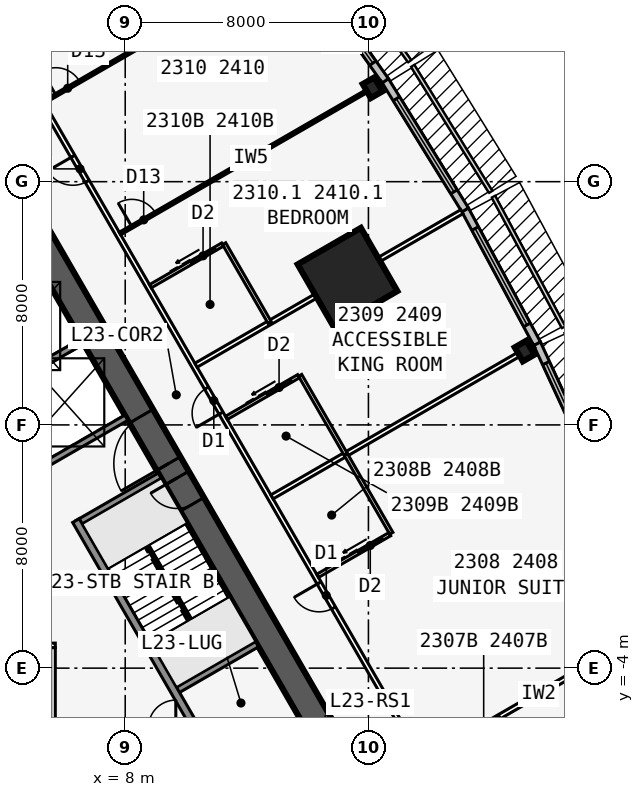
"""IFC4 building model, lengths in metres.
Left out: names, types, materials, properties, quantities, classifications, styles, units other than length and angle.
Written with IfcOpenShell. Run it as: python <this file> out.ifc"""

import sys

from ifc_helpers import new_model, si_unit, direction, frame, frame_2d, origin, origin_2d, place, context, subcontext, project, spatial, rectangle, i_section, extrude, element, fill, save


model = new_model("IFC4")
c1 = context("Model", 3, precision=1e-05, world=origin(), true_north=direction((0.0, 1.0)))
c2 = subcontext(c1, "Body", "Model", "MODEL_VIEW")
j1 = project(units=[si_unit("LENGTHUNIT", "METRE"), si_unit("PLANEANGLEUNIT", "RADIAN")], contexts=[c1])
p1 = place(None, origin())
s1 = spatial("IfcSite", under=j1, at=p1, CompositionType="ELEMENT")
p2 = place(p1, origin())
s2 = spatial("IfcBuilding", under=s1, at=p2, CompositionType="ELEMENT")
p3 = place(p2, frame((0.0, 0.0, 89.7)))
s3 = spatial("IfcBuildingStorey", under=s2, at=p3, CompositionType="ELEMENT", Elevation=89.7)
p4 = place(p3, frame((16.5, -9.526, 0.0), z_axis=(0.0, 0.0, 1.0), x_axis=(-0.499999749417, 0.866025548458, 0.0)))
e1 = element("IfcWall", 1, at=p4, inside=s3, PredefinedType="SHEAR", context=c2, shape_type="SweptSolid", body=[
    extrude(rectangle(XDim=33.0, YDim=0.9, at=frame_2d((16.5, 0.0))), origin(), (0.0, 0.0, 1.0), 3.4),
])
p5 = place(p4, frame((14.15, 0.0, 0.0)))
e2 = element("IfcOpeningElement", 2, at=p5, cuts=e1, PredefinedType="OPENING", context=c2, shape_type="SweptSolid", body=[
    extrude(rectangle(XDim=1.8, YDim=2.13, at=frame_2d((0.9, 1.065))), frame((0.0, 0.46, 0.0), z_axis=(0.0, -1.0, 0.0), x_axis=(1.0, 0.0, 0.0)), (0.0, 0.0, 1.0), 0.92),
])
p6 = place(p4, frame((12.6, 0.0, 0.0)))
e3 = element("IfcOpeningElement", 3, at=p6, cuts=e1, PredefinedType="OPENING", context=c2, shape_type="SweptSolid", body=[
    extrude(rectangle(XDim=1.0, YDim=2.13, at=frame_2d((0.5, 1.065))), frame((0.0, 0.46, 0.0), z_axis=(0.0, -1.0, 0.0), x_axis=(1.0, 0.0, 0.0)), (0.0, 0.0, 1.0), 0.92),
])
p7 = place(p3, frame((10.245, -5.843, 0.0), z_axis=(0.0, 0.0, 1.0), x_axis=(-0.499993009313, 0.866029439822, 0.0)))
e4 = element("IfcWall", 4, at=p7, inside=s3, PredefinedType="SOLIDWALL", context=c2, shape_type="SweptSolid", body=[
    extrude(rectangle(XDim=7.733, YDim=0.25, at=frame_2d((3.866, 0.0))), origin(), (0.0, 0.0, 1.0), 3.235),
])
for number, where, z_axis, x_axis in (
    (5, (9.629, -4.775, 0.0), (0.0, 0.0, 1.0), (0.866, 0.5, 0.0)),
    (6, (6.429, 0.767, 0.0), (0.0, 0.0, 1.0), (0.866, 0.5, 0.0)),
    (7, (5.329, 2.673, 0.0), (0.0, 0.0, 1.0), (0.866, 0.5, 0.0)),
    (8, (3.879, 5.184, 0.0), (0.0, 0.0, 1.0), (0.866, 0.5, 0.0)),
):
    element("IfcWall", number, at=place(p3, frame(where, z_axis=z_axis, x_axis=x_axis)), inside=s3, PredefinedType="SOLIDWALL", context=c2, shape_type="SweptSolid", body=[
        extrude(rectangle(XDim=3.125, YDim=0.2, at=frame_2d((1.562, 0.0))), origin(), (0.0, 0.0, 1.0), 3.235),
    ])
for number, where, z_axis, x_axis in (
    (9, (21.137, 6.43, 0.0), (0.0, 0.0, 1.0), (0.866, 0.5, 0.0)),
    (10, (16.137, 15.09, 0.0), (0.0, 0.0, 1.0), (0.866, 0.5, 0.0)),
):
    element("IfcColumn", number, at=place(p3, frame(where, z_axis=z_axis, x_axis=x_axis)), inside=s3, PredefinedType="COLUMN", context=c2, shape_type="SweptSolid", body=[
        extrude(i_section(OverallWidth=0.442, OverallDepth=0.531, WebThickness=0.066, FlangeThickness=0.106, at=origin_2d()), origin(), (0.0, 0.0, 1.0), 3.4),
    ])
p8 = place(p3, frame((15.312, 8.84, 0.0), z_axis=(0.0, 0.0, 1.0), x_axis=(0.866025403784, 0.5, 0.0)))
e11 = element("IfcColumn", 11, at=p8, inside=s3, PredefinedType="COLUMN", context=c2, shape_type="SweptSolid", body=[
    extrude(rectangle(XDim=2.4, YDim=2.4, at=origin_2d()), origin(), (0.0, 0.0, 1.0), 3.4),
])
p9 = place(p3, frame((23.648, 2.119, 0.0), z_axis=(0.0, 0.0, 1.0), x_axis=(-0.419203100754, 0.907892482796, 0.0)))
e12 = element("IfcWall", 12, at=p9, inside=s3, PredefinedType="STANDARD", context=c2, shape_type="SweptSolid", body=[
    extrude(rectangle(XDim=5.021, YDim=0.25, at=frame_2d((2.51, 0.0))), origin(), (0.0, 0.0, 1.0), 3.235),
])
p10 = place(p9, frame((0.71, 0.0, 0.45)))
e13 = element("IfcOpeningElement", 13, at=p10, cuts=e12, PredefinedType="OPENING", context=c2, shape_type="SweptSolid", body=[
    extrude(rectangle(XDim=3.6, YDim=2.4, at=frame_2d((1.8, 1.2))), frame((0.0, 0.135, 0.0), z_axis=(0.0, -1.0, 0.0), x_axis=(1.0, 0.0, 0.0)), (0.0, 0.0, 1.0), 0.27),
])
p11 = place(p3, frame((21.547, 6.671, 0.0), z_axis=(0.0, 0.0, 1.0), x_axis=(-0.473412820489, 0.880840678782, 0.0)))
e14 = element("IfcWall", 14, at=p11, inside=s3, PredefinedType="STANDARD", context=c2, shape_type="SweptSolid", body=[
    extrude(rectangle(XDim=5.002, YDim=0.25, at=frame_2d((2.501, 0.0))), origin(), (0.0, 0.0, 1.0), 3.235),
])
p12 = place(p11, frame((0.701, 0.0, 0.45)))
e15 = element("IfcOpeningElement", 15, at=p12, cuts=e14, PredefinedType="OPENING", context=c2, shape_type="SweptSolid", body=[
    extrude(rectangle(XDim=3.6, YDim=2.4, at=frame_2d((1.8, 1.2))), frame((0.0, 0.135, 0.0), z_axis=(0.0, -1.0, 0.0), x_axis=(1.0, 0.0, 0.0)), (0.0, 0.0, 1.0), 0.27),
])
p13 = place(p3, frame((19.182, 11.071, 0.0), z_axis=(0.0, 0.0, 1.0), x_axis=(-0.526132807704, 0.850402415717, 0.0)))
e16 = element("IfcWall", 16, at=p13, inside=s3, PredefinedType="STANDARD", context=c2, shape_type="SweptSolid", body=[
    extrude(rectangle(XDim=5.002, YDim=0.25, at=frame_2d((2.501, 0.0))), origin(), (0.0, 0.0, 1.0), 3.235),
])
p14 = place(p13, frame((0.701, 0.0, 0.45)))
e17 = element("IfcOpeningElement", 17, at=p14, cuts=e16, PredefinedType="OPENING", context=c2, shape_type="SweptSolid", body=[
    extrude(rectangle(XDim=3.6, YDim=2.4, at=frame_2d((1.8, 1.2))), frame((0.0, 0.135, 0.0), z_axis=(0.0, -1.0, 0.0), x_axis=(1.0, 0.0, 0.0)), (0.0, 0.0, 1.0), 0.27),
])
p15 = place(p3, frame((16.555, 15.318, 0.0), z_axis=(0.0, 0.0, 1.0), x_axis=(-0.5766431066, 0.81699616132, 0.0)))
e18 = element("IfcWall", 18, at=p15, inside=s3, PredefinedType="STANDARD", context=c2, shape_type="SweptSolid", body=[
    extrude(rectangle(XDim=5.021, YDim=0.25, at=frame_2d((2.51, 0.0))), origin(), (0.0, 0.0, 1.0), 3.235),
])
p16 = place(p15, frame((0.71, 0.0, 0.45)))
e19 = element("IfcOpeningElement", 19, at=p16, cuts=e18, PredefinedType="OPENING", context=c2, shape_type="SweptSolid", body=[
    extrude(rectangle(XDim=3.6, YDim=2.4, at=frame_2d((1.8, 1.2))), frame((0.0, 0.135, 0.0), z_axis=(0.0, -1.0, 0.0), x_axis=(1.0, 0.0, 0.0)), (0.0, 0.0, 1.0), 0.27),
])
p17 = place(p3, frame((20.027, -10.985, 0.0), z_axis=(0.0, 0.0, 1.0), x_axis=(-0.500001677587, 0.866024435227, 0.0)))
e20 = element("IfcWall", 20, at=p17, inside=s3, PredefinedType="PARTITIONING", context=c2, shape_type="SweptSolid", body=[
    extrude(rectangle(XDim=39.054, YDim=0.15, at=frame_2d((19.527, 0.0))), origin(), (0.0, 0.0, 1.0), 3.235),
])
p18 = place(p17, frame((0.352, 0.0, 0.0)))
e21 = element("IfcOpeningElement", 21, at=p18, cuts=e20, PredefinedType="OPENING", context=c2, shape_type="SweptSolid", body=[
    extrude(rectangle(XDim=0.95, YDim=2.13, at=frame_2d((0.475, 1.065))), frame((0.0, 0.085, 0.0), z_axis=(0.0, -1.0, 0.0), x_axis=(1.0, 0.0, 0.0)), (0.0, 0.0, 1.0), 0.17),
])
p19 = place(p17, frame((10.352, 0.0, 0.0)))
e22 = element("IfcOpeningElement", 22, at=p19, cuts=e20, PredefinedType="OPENING", context=c2, shape_type="SweptSolid", body=[
    extrude(rectangle(XDim=0.95, YDim=2.13, at=frame_2d((0.475, 1.065))), frame((0.0, 0.085, 0.0), z_axis=(0.0, -1.0, 0.0), x_axis=(1.0, 0.0, 0.0)), (0.0, 0.0, 1.0), 0.17),
])
p20 = place(p17, frame((17.752, 0.0, 0.0)))
e23 = element("IfcOpeningElement", 23, at=p20, cuts=e20, PredefinedType="OPENING", context=c2, shape_type="SweptSolid", body=[
    extrude(rectangle(XDim=0.95, YDim=2.13, at=frame_2d((0.475, 1.065))), frame((0.0, 0.085, 0.0), z_axis=(0.0, -1.0, 0.0), x_axis=(1.0, 0.0, 0.0)), (0.0, 0.0, 1.0), 0.17),
])
p21 = place(p17, frame((26.552, 0.0, 0.0)))
e24 = element("IfcOpeningElement", 24, at=p21, cuts=e20, PredefinedType="OPENING", context=c2, shape_type="SweptSolid", body=[
    extrude(rectangle(XDim=0.95, YDim=2.13, at=frame_2d((0.475, 1.065))), frame((0.0, 0.085, 0.0), z_axis=(0.0, -1.0, 0.0), x_axis=(1.0, 0.0, 0.0)), (0.0, 0.0, 1.0), 0.17),
])
p22 = place(p17, frame((37.752, 0.0, 0.0)))
e25 = element("IfcOpeningElement", 25, at=p22, cuts=e20, PredefinedType="OPENING", context=c2, shape_type="SweptSolid", body=[
    extrude(rectangle(XDim=0.95, YDim=2.13, at=frame_2d((0.475, 1.065))), frame((0.0, 0.085, 0.0), z_axis=(0.0, -1.0, 0.0), x_axis=(1.0, 0.0, 0.0)), (0.0, 0.0, 1.0), 0.17),
])
p23 = place(p3, frame((17.829, -7.027, 0.0), z_axis=(0.0, 0.0, 1.0), x_axis=(0.866032659912, 0.499987431809, 0.0)))
e26 = element("IfcWall", 26, at=p23, inside=s3, PredefinedType="PARTITIONING", context=c2, shape_type="SweptSolid", body=[
    extrude(rectangle(XDim=8.72, YDim=0.15, at=frame_2d((4.36, 0.0))), origin(), (0.0, 0.0, 1.0), 2.389),
])
p24 = place(p3, frame((12.829, 1.633, 0.0), z_axis=(0.0, 0.0, 1.0), x_axis=(0.866026934769, 0.499997348248, 0.0)))
e27 = element("IfcWall", 27, at=p24, inside=s3, PredefinedType="PARTITIONING", context=c2, shape_type="SweptSolid", body=[
    extrude(rectangle(XDim=9.943, YDim=0.15, at=frame_2d((4.971, 0.0))), origin(), (0.0, 0.0, 1.0), 2.389),
])
p25 = place(p3, frame((10.329, 5.963, 0.0), z_axis=(0.0, 0.0, 1.0), x_axis=(0.866021688545, 0.500006434927, 0.0)))
e28 = element("IfcWall", 28, at=p25, inside=s3, PredefinedType="PARTITIONING", context=c2, shape_type="SweptSolid", body=[
    extrude(rectangle(XDim=10.096, YDim=0.15, at=frame_2d((5.048, 0.0))), origin(), (0.0, 0.0, 1.0), 2.389),
])
p26 = place(p3, frame((7.829, 10.293, 0.0), z_axis=(0.0, 0.0, 1.0), x_axis=(0.866016302457, 0.50001576363, 0.0)))
e29 = element("IfcWall", 29, at=p26, inside=s3, PredefinedType="PARTITIONING", context=c2, shape_type="SweptSolid", body=[
    extrude(rectangle(XDim=9.943, YDim=0.1, at=frame_2d((4.972, 0.0))), origin(), (0.0, 0.0, 1.0), 2.389),
])
p27 = place(p26, frame((0.45, 0.0, 0.0)))
e30 = element("IfcOpeningElement", 30, at=p27, cuts=e29, PredefinedType="OPENING", context=c2, shape_type="SweptSolid", body=[
    extrude(rectangle(XDim=0.9, YDim=2.13, at=frame_2d((0.45, 1.065))), frame((0.0, 0.06, 0.0), z_axis=(0.0, -1.0, 0.0), x_axis=(1.0, 0.0, 0.0)), (0.0, 0.0, 1.0), 0.12),
])
p28 = place(p3, frame((5.329, 14.623, 0.0), z_axis=(0.0, 0.0, 1.0), x_axis=(0.866018409083, 0.500012114982, 0.0)))
e31 = element("IfcWall", 31, at=p28, inside=s3, PredefinedType="PARTITIONING", context=c2, shape_type="SweptSolid", body=[
    extrude(rectangle(XDim=9.485, YDim=0.1, at=frame_2d((4.742, 0.0))), origin(), (0.0, 0.0, 1.0), 2.389),
])
p29 = place(p28, frame((0.45, 0.0, 0.0)))
e32 = element("IfcOpeningElement", 32, at=p29, cuts=e31, PredefinedType="OPENING", context=c2, shape_type="SweptSolid", body=[
    extrude(rectangle(XDim=0.9, YDim=2.13, at=frame_2d((0.45, 1.065))), frame((0.0, 0.06, 0.0), z_axis=(0.0, -1.0, 0.0), x_axis=(1.0, 0.0, 0.0)), (0.0, 0.0, 1.0), 0.12),
])
for number, where, z_axis, x_axis in (
    (33, (21.753, -8.225, 0.0), (0.0, 0.0, 1.0), (-0.5, 0.866, 0.0)),
    (34, (16.753, 0.435, 0.0), (0.0, 0.0, 1.0), (-0.5, 0.866, 0.0)),
):
    element("IfcWall", number, at=place(p3, frame(where, z_axis=z_axis, x_axis=x_axis)), inside=s3, PredefinedType="PLUMBINGWALL", context=c2, shape_type="SweptSolid", body=[
        extrude(rectangle(XDim=3.0, YDim=0.12, at=frame_2d((1.5, 0.0))), origin(), (0.0, 0.0, 1.0), 3.235),
    ])
p30 = place(p3, frame((14.329, -0.965, 0.0), z_axis=(0.0, 0.0, 1.0), x_axis=(0.866035715982, 0.499982138324, 0.0)))
e35 = element("IfcWall", 35, at=p30, inside=s3, PredefinedType="PLUMBINGWALL", context=c2, shape_type="SweptSolid", body=[
    extrude(rectangle(XDim=2.74, YDim=0.12, at=frame_2d((1.37, 0.0))), origin(), (0.0, 0.0, 1.0), 3.235),
])
p31 = place(p30, frame((1.55, 0.0, 0.0)))
e36 = element("IfcOpeningElement", 36, at=p31, cuts=e35, PredefinedType="OPENING", context=c2, shape_type="SweptSolid", body=[
    extrude(rectangle(XDim=0.9, YDim=2.13, at=frame_2d((0.45, 1.065))), frame((0.0, 0.07, 0.0), z_axis=(0.0, -1.0, 0.0), x_axis=(1.0, 0.0, 0.0)), (0.0, 0.0, 1.0), 0.14),
])
p32 = place(p3, frame((15.253, 3.033, 0.0), z_axis=(0.0, 0.0, 1.0), x_axis=(-0.499990139034, 0.866031096941, 0.0)))
e37 = element("IfcWall", 37, at=p32, inside=s3, PredefinedType="PLUMBINGWALL", context=c2, shape_type="SweptSolid", body=[
    extrude(rectangle(XDim=3.0, YDim=0.12, at=frame_2d((1.5, 0.0))), origin(), (0.0, 0.0, 1.0), 3.235),
])
p33 = place(p3, frame((11.329, 4.231, 0.0), z_axis=(0.0, 0.0, 1.0), x_axis=(0.866035715982, 0.499982138324, 0.0)))
e38 = element("IfcWall", 38, at=p33, inside=s3, PredefinedType="PLUMBINGWALL", context=c2, shape_type="SweptSolid", body=[
    extrude(rectangle(XDim=2.74, YDim=0.12, at=frame_2d((1.37, 0.0))), origin(), (0.0, 0.0, 1.0), 3.235),
])
p34 = place(p33, frame((1.55, 0.0, 0.0)))
e39 = element("IfcOpeningElement", 39, at=p34, cuts=e38, PredefinedType="OPENING", context=c2, shape_type="SweptSolid", body=[
    extrude(rectangle(XDim=0.9, YDim=2.13, at=frame_2d((0.45, 1.065))), frame((0.0, 0.07, 0.0), z_axis=(0.0, -1.0, 0.0), x_axis=(1.0, 0.0, 0.0)), (0.0, 0.0, 1.0), 0.14),
])
p35 = place(p3, frame((12.753, 7.363, 0.0), z_axis=(0.0, 0.0, 1.0), x_axis=(-0.499990139034, 0.866031096941, 0.0)))
e40 = element("IfcWall", 40, at=p35, inside=s3, PredefinedType="PLUMBINGWALL", context=c2, shape_type="SweptSolid", body=[
    extrude(rectangle(XDim=3.0, YDim=0.12, at=frame_2d((1.5, 0.0))), origin(), (0.0, 0.0, 1.0), 3.235),
])
p36 = place(p3, frame((8.829, 8.561, 0.0), z_axis=(0.0, 0.0, 1.0), x_axis=(0.866035715982, 0.499982138324, 0.0)))
e41 = element("IfcWall", 41, at=p36, inside=s3, PredefinedType="PLUMBINGWALL", context=c2, shape_type="SweptSolid", body=[
    extrude(rectangle(XDim=2.74, YDim=0.12, at=frame_2d((1.37, 0.0))), origin(), (0.0, 0.0, 1.0), 3.235),
])
p37 = place(p36, frame((1.55, 0.0, 0.0)))
e42 = element("IfcOpeningElement", 42, at=p37, cuts=e41, PredefinedType="OPENING", context=c2, shape_type="SweptSolid", body=[
    extrude(rectangle(XDim=0.9, YDim=2.13, at=frame_2d((0.45, 1.065))), frame((0.0, 0.07, 0.0), z_axis=(0.0, -1.0, 0.0), x_axis=(1.0, 0.0, 0.0)), (0.0, 0.0, 1.0), 0.14),
])
p38 = place(p3, frame((-2.65, -3.251, 0.0), z_axis=(0.0, 0.0, 1.0), x_axis=(1.0, 0.0, 0.0)))
e43 = element("IfcWall", 43, at=p38, inside=s3, PredefinedType="PARTITIONING", context=c2, shape_type="SweptSolid", body=[
    extrude(rectangle(XDim=8.35, YDim=0.15, at=frame_2d((4.175, 0.0))), origin(), (0.0, 0.0, 1.0), 3.235),
])
p39 = place(p3, frame((5.625, -5.826, 0.0), z_axis=(0.0, 0.0, 1.0), x_axis=(0.0, 1.0, 0.0)))
e44 = element("IfcWall", 44, at=p39, inside=s3, PredefinedType="PARTITIONING", context=c2, shape_type="SweptSolid", body=[
    extrude(rectangle(XDim=2.5, YDim=0.15, at=frame_2d((1.25, 0.0))), origin(), (0.0, 0.0, 1.0), 3.235),
])
p40 = place(p3, frame((10.135, -2.401, 0.0), z_axis=(0.0, 0.0, 1.0), x_axis=(-0.499992232847, 0.866029888106, 0.0)))
e45 = element("IfcWall", 45, at=p40, inside=s3, PredefinedType="SOLIDWALL", context=c2, shape_type="SweptSolid", body=[
    extrude(rectangle(XDim=2.794, YDim=0.1, at=frame_2d((1.397, 0.0))), origin(), (0.0, 0.0, 1.0), 3.4),
])
p41 = place(p10, origin())
e46 = element("IfcWindow", 46, at=p41, inside=s3, PartitioningType="SINGLE_PANEL", PredefinedType="WINDOW", context=c2, shape_type="SweptSolid", body=[
    extrude(rectangle(XDim=3.6, YDim=2.4, at=frame_2d((1.8, 1.2))), frame((0.0, 0.03, 0.0), z_axis=(0.0, -1.0, 0.0), x_axis=(1.0, 0.0, 0.0)), (0.0, 0.0, 1.0), 0.06),
])
fill(e13, e46)
p42 = place(p12, origin())
e47 = element("IfcWindow", 47, at=p42, inside=s3, PartitioningType="SINGLE_PANEL", PredefinedType="WINDOW", context=c2, shape_type="SweptSolid", body=[
    extrude(rectangle(XDim=3.6, YDim=2.4, at=frame_2d((1.8, 1.2))), frame((0.0, 0.03, 0.0), z_axis=(0.0, -1.0, 0.0), x_axis=(1.0, 0.0, 0.0)), (0.0, 0.0, 1.0), 0.06),
])
fill(e15, e47)
p43 = place(p14, origin())
e48 = element("IfcWindow", 48, at=p43, inside=s3, PartitioningType="SINGLE_PANEL", PredefinedType="WINDOW", context=c2, shape_type="SweptSolid", body=[
    extrude(rectangle(XDim=3.6, YDim=2.4, at=frame_2d((1.8, 1.2))), frame((0.0, 0.03, 0.0), z_axis=(0.0, -1.0, 0.0), x_axis=(1.0, 0.0, 0.0)), (0.0, 0.0, 1.0), 0.06),
])
fill(e17, e48)
p44 = place(p16, origin())
e49 = element("IfcWindow", 49, at=p44, inside=s3, PartitioningType="SINGLE_PANEL", PredefinedType="WINDOW", context=c2, shape_type="SweptSolid", body=[
    extrude(rectangle(XDim=3.6, YDim=2.4, at=frame_2d((1.8, 1.2))), frame((0.0, 0.03, 0.0), z_axis=(0.0, -1.0, 0.0), x_axis=(1.0, 0.0, 0.0)), (0.0, 0.0, 1.0), 0.06),
])
fill(e19, e49)
p45 = place(p27, origin())
e50 = element("IfcDoor", 50, at=p45, inside=s3, OperationType="SINGLE_SWING_LEFT", PredefinedType="DOOR", context=c2, shape_type="SweptSolid", body=[
    extrude(rectangle(XDim=0.9, YDim=2.13, at=frame_2d((0.45, 1.065))), frame((0.0, 0.025, 0.0), z_axis=(0.0, -1.0, 0.0), x_axis=(1.0, 0.0, 0.0)), (0.0, 0.0, 1.0), 0.05),
])
fill(e30, e50)
p46 = place(p29, origin())
e51 = element("IfcDoor", 51, at=p46, inside=s3, OperationType="SINGLE_SWING_LEFT", PredefinedType="DOOR", context=c2, shape_type="SweptSolid", body=[
    extrude(rectangle(XDim=0.9, YDim=2.13, at=frame_2d((0.45, 1.065))), frame((0.0, 0.025, 0.0), z_axis=(0.0, -1.0, 0.0), x_axis=(1.0, 0.0, 0.0)), (0.0, 0.0, 1.0), 0.05),
])
fill(e32, e51)
p47 = place(p31, origin())
e52 = element("IfcDoor", 52, at=p47, inside=s3, OperationType="SLIDING_TO_LEFT", PredefinedType="DOOR", context=c2, shape_type="SweptSolid", body=[
    extrude(rectangle(XDim=0.9, YDim=2.13, at=frame_2d((0.45, 1.065))), frame((0.0, 0.025, 0.0), z_axis=(0.0, -1.0, 0.0), x_axis=(1.0, 0.0, 0.0)), (0.0, 0.0, 1.0), 0.05),
])
fill(e36, e52)
p48 = place(p19, origin())
e53 = element("IfcDoor", 53, at=p48, inside=s3, OperationType="SINGLE_SWING_RIGHT", PredefinedType="DOOR", context=c2, shape_type="SweptSolid", body=[
    extrude(rectangle(XDim=0.95, YDim=2.13, at=frame_2d((0.475, 1.065))), frame((0.0, 0.025, 0.0), z_axis=(0.0, -1.0, 0.0), x_axis=(1.0, 0.0, 0.0)), (0.0, 0.0, 1.0), 0.05),
])
fill(e22, e53)
p49 = place(p34, origin())
e54 = element("IfcDoor", 54, at=p49, inside=s3, OperationType="SLIDING_TO_LEFT", PredefinedType="DOOR", context=c2, shape_type="SweptSolid", body=[
    extrude(rectangle(XDim=0.9, YDim=2.13, at=frame_2d((0.45, 1.065))), frame((0.0, 0.025, 0.0), z_axis=(0.0, -1.0, 0.0), x_axis=(1.0, 0.0, 0.0)), (0.0, 0.0, 1.0), 0.05),
])
fill(e39, e54)
p50 = place(p20, origin())
e55 = element("IfcDoor", 55, at=p50, inside=s3, OperationType="SINGLE_SWING_LEFT", PredefinedType="DOOR", context=c2, shape_type="SweptSolid", body=[
    extrude(rectangle(XDim=0.95, YDim=2.13, at=frame_2d((0.475, 1.065))), frame((0.0, 0.025, 0.0), z_axis=(0.0, -1.0, 0.0), x_axis=(1.0, 0.0, 0.0)), (0.0, 0.0, 1.0), 0.05),
])
fill(e23, e55)
p51 = place(p37, origin())
e56 = element("IfcDoor", 56, at=p51, inside=s3, OperationType="SLIDING_TO_LEFT", PredefinedType="DOOR", context=c2, shape_type="SweptSolid", body=[
    extrude(rectangle(XDim=0.9, YDim=2.13, at=frame_2d((0.45, 1.065))), frame((0.0, 0.025, 0.0), z_axis=(0.0, -1.0, 0.0), x_axis=(1.0, 0.0, 0.0)), (0.0, 0.0, 1.0), 0.05),
])
fill(e42, e56)
p52 = place(p21, origin())
e57 = element("IfcDoor", 57, at=p52, inside=s3, OperationType="SINGLE_SWING_RIGHT", PredefinedType="DOOR", context=c2, shape_type="SweptSolid", body=[
    extrude(rectangle(XDim=0.95, YDim=2.13, at=frame_2d((0.475, 1.065))), frame((0.0, 0.025, 0.0), z_axis=(0.0, -1.0, 0.0), x_axis=(1.0, 0.0, 0.0)), (0.0, 0.0, 1.0), 0.05),
])
fill(e24, e57)
p53 = place(p5, origin())
e58 = element("IfcDoor", 58, at=p53, inside=s3, OperationType="DOUBLE_DOOR_SINGLE_SWING", PredefinedType="DOOR", context=c2, shape_type="SweptSolid", body=[
    extrude(rectangle(XDim=1.8, YDim=2.13, at=frame_2d((0.9, 1.065))), frame((0.0, 0.025, 0.0), z_axis=(0.0, -1.0, 0.0), x_axis=(1.0, 0.0, 0.0)), (0.0, 0.0, 1.0), 0.05),
])
fill(e2, e58)
p54 = place(p6, origin())
e59 = element("IfcDoor", 59, at=p54, inside=s3, OperationType="SINGLE_SWING_RIGHT", PredefinedType="DOOR", context=c2, shape_type="SweptSolid", body=[
    extrude(rectangle(XDim=1.0, YDim=2.13, at=frame_2d((0.5, 1.065))), frame((0.0, 0.025, 0.0), z_axis=(0.0, -1.0, 0.0), x_axis=(1.0, 0.0, 0.0)), (0.0, 0.0, 1.0), 0.05),
])
fill(e3, e59)
save(model, sys.argv[1])
